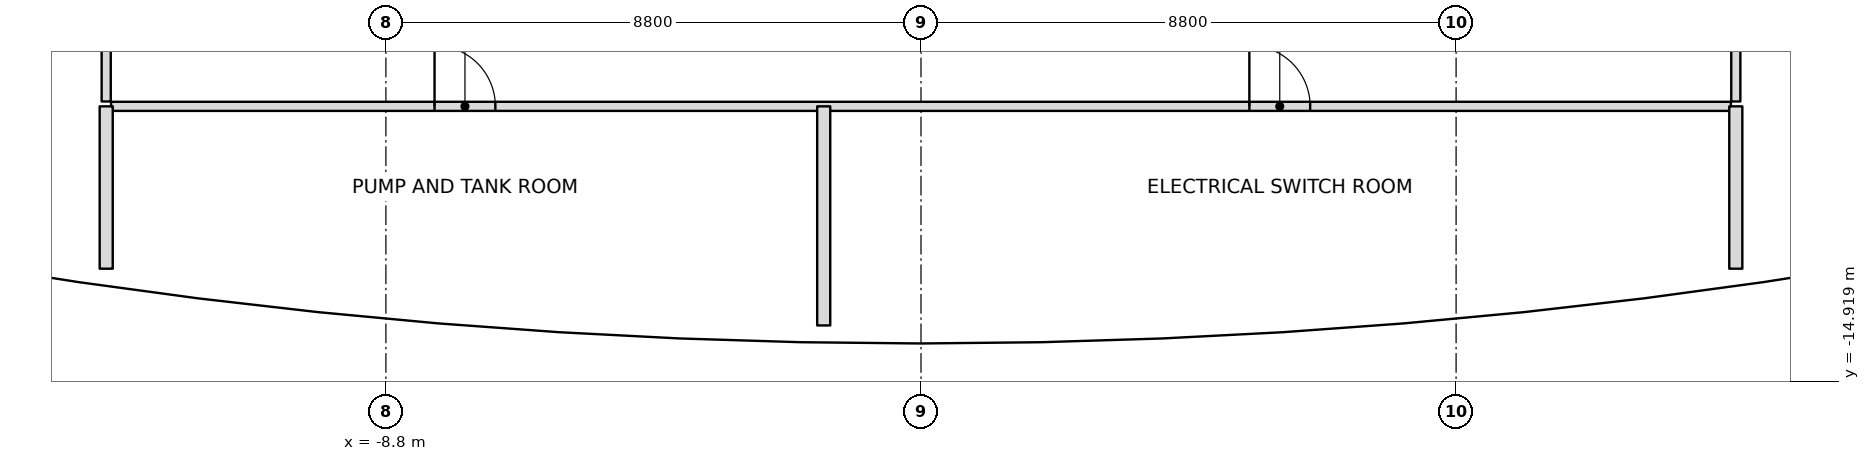
"""IFC4 building model, lengths in metres.
Left out: names, types, materials, properties, quantities, classifications, styles, units other than length and angle.
Written with IfcOpenShell. Run it as: python <this file> out.ifc"""

import sys

from ifc_helpers import new_model, si_unit, direction, frame, frame_2d, origin, place, context, subcontext, project, spatial, rectangle, extrude, element, fill, save


model = new_model("IFC4")
c1 = context("Model", 3, precision=1e-05, world=origin(), true_north=direction((0.0, 1.0)))
c2 = subcontext(c1, "Body", "Model", "MODEL_VIEW")
j1 = project(units=[si_unit("LENGTHUNIT", "METRE"), si_unit("PLANEANGLEUNIT", "RADIAN")], contexts=[c1])
p1 = place(None, origin())
s1 = spatial("IfcSite", under=j1, at=p1, CompositionType="ELEMENT")
p2 = place(p1, origin())
s2 = spatial("IfcBuilding", under=s1, at=p2, CompositionType="ELEMENT")
p3 = place(p2, frame((0.0, 0.0, 355.6)))
s3 = spatial("IfcBuildingStorey", under=s2, at=p3, CompositionType="ELEMENT", Elevation=355.6)
p4 = place(p3, frame((-13.4, -10.4, 0.0), z_axis=(0.0, 0.0, 1.0), x_axis=(0.0, -1.0, 0.0)))
e1 = element("IfcWall", 1, at=p4, inside=s3, PredefinedType="PARTITIONING", context=c2, shape_type="SweptSolid", body=[
    extrude(rectangle(XDim=2.67, YDim=0.215, at=frame_2d((1.335, 0.0))), origin(), (0.0, 0.0, 1.0), 4.85),
])
p5 = place(p3, frame((-1.6, -10.4, 0.0), z_axis=(0.0, 0.0, 1.0), x_axis=(0.0, -1.0, 0.0)))
e2 = element("IfcWall", 2, at=p5, inside=s3, PredefinedType="PARTITIONING", context=c2, shape_type="SweptSolid", body=[
    extrude(rectangle(XDim=3.604, YDim=0.215, at=frame_2d((1.802, 0.0))), origin(), (0.0, 0.0, 1.0), 4.643),
])
p6 = place(p3, frame((13.4, -10.4, 0.0), z_axis=(0.0, 0.0, 1.0), x_axis=(0.0, -1.0, 0.0)))
e3 = element("IfcWall", 3, at=p6, inside=s3, PredefinedType="PARTITIONING", context=c2, shape_type="SweptSolid", body=[
    extrude(rectangle(XDim=2.67, YDim=0.215, at=frame_2d((1.335, 0.0))), origin(), (0.0, 0.0, 1.0), 4.85),
])
p7 = place(p3, frame((-13.4, 4.752, 0.0), z_axis=(0.0, 0.0, 1.0), x_axis=(0.0, -1.0, 0.0)))
e4 = element("IfcWall", 4, at=p7, inside=s3, PredefinedType="PARTITIONING", context=c2, shape_type="SweptSolid", body=[
    extrude(rectangle(XDim=15.072, YDim=0.15, at=frame_2d((7.536, 0.0))), origin(), (0.0, 0.0, 1.0), 4.497),
])
p8 = place(p7, frame((6.836, 0.0, 0.0)))
e5 = element("IfcOpeningElement", 5, at=p8, cuts=e4, PredefinedType="OPENING", context=c2, shape_type="SweptSolid", body=[
    extrude(rectangle(XDim=1.5, YDim=2.4, at=frame_2d((0.75, 1.2))), frame((0.0, 0.075, 0.0), z_axis=(0.0, -1.0, 0.0), x_axis=(1.0, 0.0, 0.0)), (0.0, 0.0, 1.0), 0.15),
])
p9 = place(p3, frame((-13.32, -10.4, 0.0), z_axis=(0.0, 0.0, 1.0), x_axis=(1.0, 0.0, 0.0)))
e6 = element("IfcWall", 6, at=p9, inside=s3, PredefinedType="PARTITIONING", context=c2, shape_type="SweptSolid", body=[
    extrude(rectangle(XDim=26.64, YDim=0.15, at=frame_2d((13.32, 0.0))), origin(), (0.0, 0.0, 1.0), 4.643),
])
p10 = place(p9, frame((5.32, 0.0, 0.0)))
e7 = element("IfcOpeningElement", 7, at=p10, cuts=e6, PredefinedType="OPENING", context=c2, shape_type="SweptSolid", body=[
    extrude(rectangle(XDim=1.0, YDim=2.4, at=frame_2d((0.5, 1.2))), frame((0.0, 0.075, 0.0), z_axis=(0.0, -1.0, 0.0), x_axis=(1.0, 0.0, 0.0)), (0.0, 0.0, 1.0), 0.15),
])
p11 = place(p9, frame((18.72, 0.0, 0.0)))
e8 = element("IfcOpeningElement", 8, at=p11, cuts=e6, PredefinedType="OPENING", context=c2, shape_type="SweptSolid", body=[
    extrude(rectangle(XDim=1.0, YDim=2.4, at=frame_2d((0.5, 1.2))), frame((0.0, 0.075, 0.0), z_axis=(0.0, -1.0, 0.0), x_axis=(1.0, 0.0, 0.0)), (0.0, 0.0, 1.0), 0.15),
])
p12 = place(p3, frame((13.4, -10.32, 0.0), z_axis=(0.0, 0.0, 1.0), x_axis=(0.0, 1.0, 0.0)))
e9 = element("IfcWall", 9, at=p12, inside=s3, PredefinedType="PARTITIONING", context=c2, shape_type="SweptSolid", body=[
    extrude(rectangle(XDim=15.072, YDim=0.15, at=frame_2d((7.536, 0.0))), origin(), (0.0, 0.0, 1.0), 4.497),
])
p13 = place(p12, frame((6.736, 0.0, 0.0)))
e10 = element("IfcOpeningElement", 10, at=p13, cuts=e9, PredefinedType="OPENING", context=c2, shape_type="SweptSolid", body=[
    extrude(rectangle(XDim=1.5, YDim=2.4, at=frame_2d((0.75, 1.2))), frame((0.0, 0.075, 0.0), z_axis=(0.0, -1.0, 0.0), x_axis=(1.0, 0.0, 0.0)), (0.0, 0.0, 1.0), 0.15),
])
p14 = place(p10, origin())
e11 = element("IfcDoor", 11, at=p14, inside=s3, OperationType="SINGLE_SWING_LEFT", PredefinedType="DOOR", context=c2, shape_type="SweptSolid", body=[
    extrude(rectangle(XDim=1.0, YDim=2.4, at=frame_2d((0.5, 1.2))), frame((0.0, 0.025, 0.0), z_axis=(0.0, -1.0, 0.0), x_axis=(1.0, 0.0, 0.0)), (0.0, 0.0, 1.0), 0.05),
])
fill(e7, e11)
p15 = place(p11, origin())
e12 = element("IfcDoor", 12, at=p15, inside=s3, OperationType="SINGLE_SWING_LEFT", PredefinedType="DOOR", context=c2, shape_type="SweptSolid", body=[
    extrude(rectangle(XDim=1.0, YDim=2.4, at=frame_2d((0.5, 1.2))), frame((0.0, 0.025, 0.0), z_axis=(0.0, -1.0, 0.0), x_axis=(1.0, 0.0, 0.0)), (0.0, 0.0, 1.0), 0.05),
])
fill(e8, e12)
save(model, sys.argv[1])
